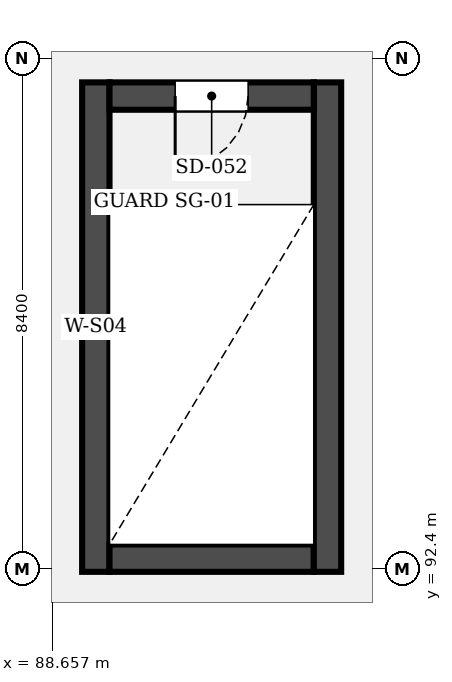
"""IFC4 building model, lengths in metres.
Left out: names, types, materials, properties, quantities, classifications, styles, units other than length and angle.
Written with IfcOpenShell. Run it as: python <this file> out.ifc"""

import sys

from ifc_helpers import new_model, si_unit, direction, frame, frame_2d, origin, place, context, subcontext, project, spatial, rectangle, extrude, element, fill, save


model = new_model("IFC4")
c1 = context("Model", 3, precision=1e-05, world=origin(), true_north=direction((0.0, 1.0)))
c2 = subcontext(c1, "Body", "Model", "MODEL_VIEW")
j1 = project(units=[si_unit("LENGTHUNIT", "METRE"), si_unit("PLANEANGLEUNIT", "RADIAN")], contexts=[c1])
p1 = place(None, origin())
s1 = spatial("IfcSite", under=j1, at=p1, CompositionType="ELEMENT")
p2 = place(p1, origin())
s2 = spatial("IfcBuilding", under=s1, at=p2, CompositionType="ELEMENT")
p3 = place(p2, frame((0.0, 0.0, 13.5)))
s3 = spatial("IfcBuildingStorey", under=s2, at=p3, CompositionType="ELEMENT", Elevation=13.5)
p4 = place(p3, frame((89.375, 100.4, 0.0), z_axis=(0.0, 0.0, 1.0), x_axis=(0.0, -1.0, 0.0)))
e1 = element("IfcWall", 1, at=p4, inside=s3, PredefinedType="SHEAR", context=c2, shape_type="SweptSolid", body=[
    extrude(rectangle(XDim=8.05, YDim=0.45, at=frame_2d((4.025, 0.0))), origin(), (0.0, 0.0, 1.0), 4.3),
])
p5 = place(p3, frame((89.6, 92.575, 0.0), z_axis=(0.0, 0.0, 1.0), x_axis=(1.0, 0.0, 0.0)))
e2 = element("IfcWall", 2, at=p5, inside=s3, PredefinedType="SHEAR", context=c2, shape_type="SweptSolid", body=[
    extrude(rectangle(XDim=3.36, YDim=0.45, at=frame_2d((1.68, 0.0))), origin(), (0.0, 0.0, 1.0), 4.3),
])
p6 = place(p3, frame((93.185, 92.35, 0.0), z_axis=(0.0, 0.0, 1.0), x_axis=(0.0, 1.0, 0.0)))
e3 = element("IfcWall", 3, at=p6, inside=s3, PredefinedType="SHEAR", context=c2, shape_type="SweptSolid", body=[
    extrude(rectangle(XDim=8.05, YDim=0.45, at=frame_2d((4.025, 0.0))), origin(), (0.0, 0.0, 1.0), 4.3),
])
p7 = place(p3, frame((92.96, 100.175, 0.0), z_axis=(0.0, 0.0, 1.0), x_axis=(-1.0, 0.0, 0.0)))
e4 = element("IfcWall", 4, at=p7, inside=s3, PredefinedType="SHEAR", context=c2, shape_type="SweptSolid", body=[
    extrude(rectangle(XDim=3.36, YDim=0.45, at=frame_2d((1.68, 0.0))), origin(), (0.0, 0.0, 1.0), 4.3),
])
p8 = place(p7, frame((1.08, 0.0, 0.0)))
e5 = element("IfcOpeningElement", 5, at=p8, cuts=e4, PredefinedType="OPENING", context=c2, shape_type="SweptSolid", body=[
    extrude(rectangle(XDim=1.2, YDim=2.2, at=frame_2d((0.6, 1.1))), frame((0.0, 0.235, 0.0), z_axis=(0.0, -1.0, 0.0), x_axis=(1.0, 0.0, 0.0)), (0.0, 0.0, 1.0), 0.47),
])
p9 = place(p8, origin())
e6 = element("IfcDoor", 6, at=p9, inside=s3, OperationType="SINGLE_SWING_RIGHT", PredefinedType="DOOR", context=c2, shape_type="SweptSolid", body=[
    extrude(rectangle(XDim=1.2, YDim=2.2, at=frame_2d((0.6, 1.1))), frame((0.0, 0.025, 0.0), z_axis=(0.0, -1.0, 0.0), x_axis=(1.0, 0.0, 0.0)), (0.0, 0.0, 1.0), 0.05),
])
fill(e5, e6)
save(model, sys.argv[1])
